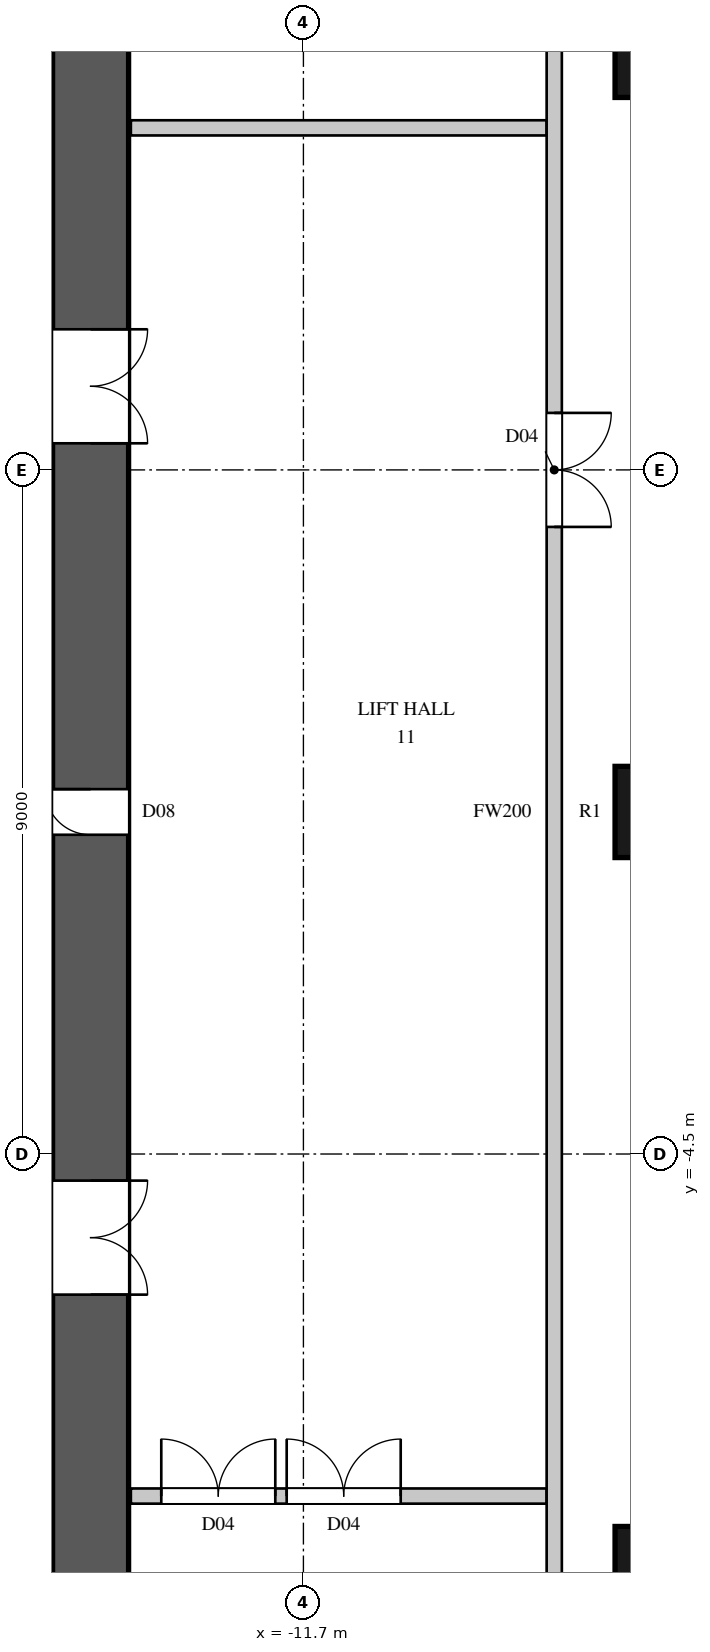
"""IFC4 building model, lengths in metres.
Left out: names, types, materials, properties, quantities, classifications, styles, units other than length and angle.
Written with IfcOpenShell. Run it as: python <this file> out.ifc"""

import sys

from ifc_helpers import new_model, si_unit, direction, frame, frame_2d, origin, origin_2d, place, context, subcontext, project, spatial, rectangle, circle, extrude, element, fill, save


model = new_model("IFC4")
c1 = context("Model", 3, precision=1e-05, world=origin(), true_north=direction((0.0, 1.0)))
c2 = subcontext(c1, "Body", "Model", "MODEL_VIEW")
j1 = project(units=[si_unit("LENGTHUNIT", "METRE"), si_unit("PLANEANGLEUNIT", "RADIAN")], contexts=[c1])
p1 = place(None, origin())
s1 = spatial("IfcSite", under=j1, at=p1, CompositionType="ELEMENT")
p2 = place(p1, origin())
s2 = spatial("IfcBuilding", under=s1, at=p2, CompositionType="ELEMENT")
p3 = place(p2, frame((0.0, 0.0, 69.9)))
s3 = spatial("IfcBuildingStorey", under=s2, at=p3, CompositionType="ELEMENT", Elevation=69.9)
for number, where, z_axis, x_axis in (
    (1, (-7.0, -10.0, 0.0), (0.0, 0.0, 1.0), (1.0, 0.0, 0.0)),
    (2, (-7.0, 0.0, 0.0), (0.0, 0.0, 1.0), (1.0, 0.0, 0.0)),
    (3, (-7.0, 10.0, 0.0), (0.0, 0.0, 1.0), (1.0, 0.0, 0.0)),
):
    element("IfcColumn", number, at=place(p3, frame(where, z_axis=z_axis, x_axis=x_axis)), inside=s3, PredefinedType="COLUMN", context=c2, shape_type="SweptSolid", body=[
        extrude(circle(Radius=0.6, at=origin_2d()), origin(), (0.0, 0.0, 1.0), 3.6),
    ])
p4 = place(p3, frame((-14.5, -14.8, 0.0), z_axis=(0.0, 0.0, 1.0), x_axis=(0.0, 1.0, 0.0)))
e4 = element("IfcWall", 4, at=p4, inside=s3, PredefinedType="SHEAR", context=c2, shape_type="SweptSolid", body=[
    extrude(rectangle(XDim=29.6, YDim=1.0, at=frame_2d((14.8, 0.0))), origin(), (0.0, 0.0, 1.0), 3.6),
])
p5 = place(p4, frame((8.45, 0.0, 0.0)))
e5 = element("IfcOpeningElement", 5, at=p5, cuts=e4, PredefinedType="OPENING", context=c2, shape_type="SweptSolid", body=[
    extrude(rectangle(XDim=1.5, YDim=2.4, at=frame_2d((0.75, 1.2))), frame((0.0, 0.51, 0.0), z_axis=(0.0, -1.0, 0.0), x_axis=(1.0, 0.0, 0.0)), (0.0, 0.0, 1.0), 1.02),
])
p6 = place(p4, frame((19.65, 0.0, 0.0)))
e6 = element("IfcOpeningElement", 6, at=p6, cuts=e4, PredefinedType="OPENING", context=c2, shape_type="SweptSolid", body=[
    extrude(rectangle(XDim=1.5, YDim=2.4, at=frame_2d((0.75, 1.2))), frame((0.0, 0.51, 0.0), z_axis=(0.0, -1.0, 0.0), x_axis=(1.0, 0.0, 0.0)), (0.0, 0.0, 1.0), 1.02),
])
p7 = place(p4, frame((14.5, 0.0, 0.0)))
e7 = element("IfcOpeningElement", 7, at=p7, cuts=e4, PredefinedType="OPENING", context=c2, shape_type="SweptSolid", body=[
    extrude(rectangle(XDim=0.6, YDim=2.0, at=frame_2d((0.3, 1.0))), frame((0.0, 0.51, 0.0), z_axis=(0.0, -1.0, 0.0), x_axis=(1.0, 0.0, 0.0)), (0.0, 0.0, 1.0), 1.02),
])
p8 = place(p3, frame((-13.97, -9.0, 0.0), z_axis=(0.0, 0.0, 1.0), x_axis=(1.0, 0.0, 0.0)))
e8 = element("IfcWall", 8, at=p8, inside=s3, PredefinedType="PARTITIONING", context=c2, shape_type="SweptSolid", body=[
    extrude(rectangle(XDim=5.47, YDim=0.2, at=frame_2d((2.735, 0.0))), origin(), (0.0, 0.0, 1.0), 3.3),
])
p9 = place(p8, frame((0.4, 0.0, 0.0)))
e9 = element("IfcOpeningElement", 9, at=p9, cuts=e8, PredefinedType="OPENING", context=c2, shape_type="SweptSolid", body=[
    extrude(rectangle(XDim=1.5, YDim=2.2, at=frame_2d((0.75, 1.1))), frame((0.0, 0.11, 0.0), z_axis=(0.0, -1.0, 0.0), x_axis=(1.0, 0.0, 0.0)), (0.0, 0.0, 1.0), 0.22),
])
p10 = place(p8, frame((2.05, 0.0, 0.0)))
e10 = element("IfcOpeningElement", 10, at=p10, cuts=e8, PredefinedType="OPENING", context=c2, shape_type="SweptSolid", body=[
    extrude(rectangle(XDim=1.5, YDim=2.2, at=frame_2d((0.75, 1.1))), frame((0.0, 0.11, 0.0), z_axis=(0.0, -1.0, 0.0), x_axis=(1.0, 0.0, 0.0)), (0.0, 0.0, 1.0), 0.22),
])
p11 = place(p3, frame((-13.97, 9.0, 0.0), z_axis=(0.0, 0.0, 1.0), x_axis=(1.0, 0.0, 0.0)))
e11 = element("IfcWall", 11, at=p11, inside=s3, PredefinedType="PARTITIONING", context=c2, shape_type="SweptSolid", body=[
    extrude(rectangle(XDim=5.47, YDim=0.2, at=frame_2d((2.735, 0.0))), origin(), (0.0, 0.0, 1.0), 3.3),
])
p12 = place(p3, frame((-8.4, -17.4, 0.0), z_axis=(0.0, 0.0, 1.0), x_axis=(0.0, 1.0, 0.0)))
e12 = element("IfcWall", 12, at=p12, inside=s3, PredefinedType="PARTITIONING", context=c2, shape_type="SweptSolid", body=[
    extrude(rectangle(XDim=34.8, YDim=0.2, at=frame_2d((17.4, 0.0))), origin(), (0.0, 0.0, 1.0), 3.3),
])
p13 = place(p12, frame((21.15, 0.0, 0.0)))
e13 = element("IfcOpeningElement", 13, at=p13, cuts=e12, PredefinedType="OPENING", context=c2, shape_type="SweptSolid", body=[
    extrude(rectangle(XDim=1.5, YDim=2.2, at=frame_2d((0.75, 1.1))), frame((0.0, 0.11, 0.0), z_axis=(0.0, -1.0, 0.0), x_axis=(1.0, 0.0, 0.0)), (0.0, 0.0, 1.0), 0.22),
])
p14 = place(p12, frame((33.75, 0.0, 0.0)))
e14 = element("IfcOpeningElement", 14, at=p14, cuts=e12, PredefinedType="OPENING", context=c2, shape_type="SweptSolid", body=[
    extrude(rectangle(XDim=0.9, YDim=2.2, at=frame_2d((0.45, 1.1))), frame((0.0, 0.11, 0.0), z_axis=(0.0, -1.0, 0.0), x_axis=(1.0, 0.0, 0.0)), (0.0, 0.0, 1.0), 0.22),
])
p15 = place(p12, frame((0.15, 0.0, 0.0)))
e15 = element("IfcOpeningElement", 15, at=p15, cuts=e12, PredefinedType="OPENING", context=c2, shape_type="SweptSolid", body=[
    extrude(rectangle(XDim=0.95, YDim=2.2, at=frame_2d((0.475, 1.1))), frame((0.0, 0.11, 0.0), z_axis=(0.0, -1.0, 0.0), x_axis=(1.0, 0.0, 0.0)), (0.0, 0.0, 1.0), 0.22),
])
p16 = place(p13, origin())
e16 = element("IfcDoor", 16, at=p16, inside=s3, OperationType="DOUBLE_DOOR_SINGLE_SWING", PredefinedType="DOOR", context=c2, shape_type="SweptSolid", body=[
    extrude(rectangle(XDim=1.5, YDim=2.2, at=frame_2d((0.75, 1.1))), frame((0.0, 0.025, 0.0), z_axis=(0.0, -1.0, 0.0), x_axis=(1.0, 0.0, 0.0)), (0.0, 0.0, 1.0), 0.05),
])
fill(e13, e16)
p17 = place(p9, origin())
e17 = element("IfcDoor", 17, at=p17, inside=s3, OperationType="DOUBLE_DOOR_SINGLE_SWING", PredefinedType="DOOR", context=c2, shape_type="SweptSolid", body=[
    extrude(rectangle(XDim=1.5, YDim=2.2, at=frame_2d((0.75, 1.1))), frame((0.0, 0.025, 0.0), z_axis=(0.0, -1.0, 0.0), x_axis=(1.0, 0.0, 0.0)), (0.0, 0.0, 1.0), 0.05),
])
fill(e9, e17)
p18 = place(p10, origin())
e18 = element("IfcDoor", 18, at=p18, inside=s3, OperationType="DOUBLE_DOOR_SINGLE_SWING", PredefinedType="DOOR", context=c2, shape_type="SweptSolid", body=[
    extrude(rectangle(XDim=1.5, YDim=2.2, at=frame_2d((0.75, 1.1))), frame((0.0, 0.025, 0.0), z_axis=(0.0, -1.0, 0.0), x_axis=(1.0, 0.0, 0.0)), (0.0, 0.0, 1.0), 0.05),
])
fill(e10, e18)
p19 = place(p5, origin())
e19 = element("IfcDoor", 19, at=p19, inside=s3, OperationType="DOUBLE_DOOR_SINGLE_SWING", PredefinedType="DOOR", context=c2, shape_type="SweptSolid", body=[
    extrude(rectangle(XDim=1.5, YDim=2.4, at=frame_2d((0.75, 1.2))), frame((0.0, -0.445, 0.0), z_axis=(0.0, -1.0, 0.0), x_axis=(1.0, 0.0, 0.0)), (0.0, 0.0, 1.0), 0.05),
])
fill(e5, e19)
p20 = place(p6, origin())
e20 = element("IfcDoor", 20, at=p20, inside=s3, OperationType="DOUBLE_DOOR_SINGLE_SWING", PredefinedType="DOOR", context=c2, shape_type="SweptSolid", body=[
    extrude(rectangle(XDim=1.5, YDim=2.4, at=frame_2d((0.75, 1.2))), frame((0.0, -0.445, 0.0), z_axis=(0.0, -1.0, 0.0), x_axis=(1.0, 0.0, 0.0)), (0.0, 0.0, 1.0), 0.05),
])
fill(e6, e20)
p21 = place(p7, origin())
e21 = element("IfcDoor", 21, at=p21, inside=s3, OperationType="SINGLE_SWING_RIGHT", PredefinedType="DOOR", context=c2, shape_type="SweptSolid", body=[
    extrude(rectangle(XDim=0.6, YDim=2.0, at=frame_2d((0.3, 1.0))), frame((0.0, 0.495, 0.0), z_axis=(0.0, -1.0, 0.0), x_axis=(1.0, 0.0, 0.0)), (0.0, 0.0, 1.0), 0.05),
])
fill(e7, e21)
save(model, sys.argv[1])
